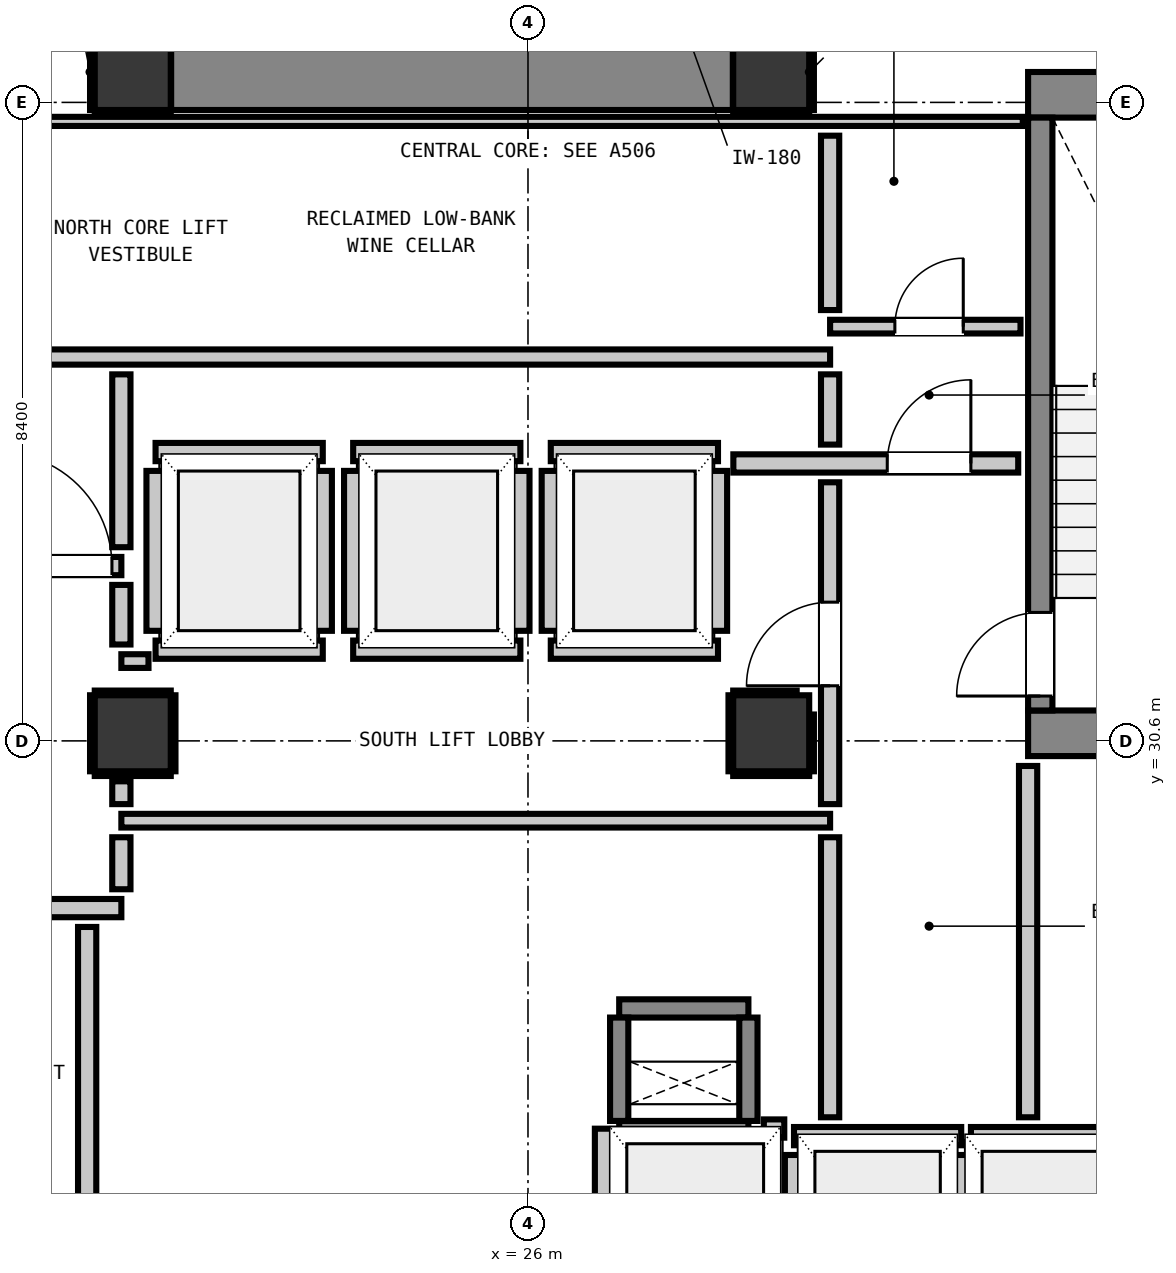
"""IFC4 building model, lengths in metres.
Left out: names, types, materials, properties, quantities, classifications, styles, units other than length and angle.
Written with IfcOpenShell. Run it as: python <this file> out.ifc"""

import sys

from ifc_helpers import new_model, si_unit, direction, frame, frame_2d, origin, origin_2d, place, context, subcontext, project, spatial, rectangle, extrude, element, fill, save


model = new_model("IFC4")
c1 = context("Model", 3, precision=1e-05, world=origin(), true_north=direction((0.0, 1.0)))
c2 = subcontext(c1, "Body", "Model", "MODEL_VIEW")
j1 = project(units=[si_unit("LENGTHUNIT", "METRE"), si_unit("PLANEANGLEUNIT", "RADIAN")], contexts=[c1])
p1 = place(None, origin())
s1 = spatial("IfcSite", under=j1, at=p1, CompositionType="ELEMENT")
p2 = place(p1, origin())
s2 = spatial("IfcBuilding", under=s1, at=p2, CompositionType="ELEMENT")
p3 = place(p2, frame((0.0, 0.0, 129.32)))
s3 = spatial("IfcBuildingStorey", under=s2, at=p3, CompositionType="ELEMENT", Elevation=129.32)
for number, where, z_axis, x_axis in (
    (1, (20.8, 39.4, 0.0), (0.0, 0.0, 1.0), (1.0, 0.0, 0.0)),
    (2, (29.2, 39.4, 0.0), (0.0, 0.0, 1.0), (1.0, 0.0, 0.0)),
):
    element("IfcColumn", number, at=place(p3, frame(where, z_axis=z_axis, x_axis=x_axis)), inside=s3, PredefinedType="COLUMN", context=c2, shape_type="SweptSolid", body=[
        extrude(rectangle(XDim=1.0, YDim=1.0, at=origin_2d()), origin(), (0.0, 0.0, 1.0), 3.32),
    ])
p4 = place(p3, frame((32.58, 39.1, 0.0), z_axis=(0.0, 0.0, 1.0), x_axis=(1.0, 0.0, 0.0)))
e3 = element("IfcWall", 3, at=p4, inside=s3, PredefinedType="SHEAR", context=c2, shape_type="SweptSolid", body=[
    extrude(rectangle(XDim=4.08, YDim=0.6, at=frame_2d((2.04, 0.0))), origin(), (0.0, 0.0, 1.0), 3.32),
])
p5 = place(p3, frame((32.58, 30.7, 0.0), z_axis=(0.0, 0.0, 1.0), x_axis=(1.0, 0.0, 0.0)))
e4 = element("IfcWall", 4, at=p5, inside=s3, PredefinedType="SHEAR", context=c2, shape_type="SweptSolid", body=[
    extrude(rectangle(XDim=3.415, YDim=0.6, at=frame_2d((1.708, 0.0))), origin(), (0.0, 0.0, 1.0), 3.32),
])
p6 = place(p3, frame((21.305, 39.4, 0.0), z_axis=(0.0, 0.0, 1.0), x_axis=(1.0, 0.0, 0.0)))
e5 = element("IfcWall", 5, at=p6, inside=s3, PredefinedType="SHEAR", context=c2, shape_type="SweptSolid", body=[
    extrude(rectangle(XDim=7.39, YDim=1.0, at=frame_2d((3.695, 0.0))), origin(), (0.0, 0.0, 1.0), 3.32),
])
p7 = place(p3, frame((32.74, 31.0, 0.0), z_axis=(0.0, 0.0, 1.0), x_axis=(0.0, 1.0, 0.0)))
e6 = element("IfcWall", 6, at=p7, inside=s3, PredefinedType="SHEAR", context=c2, shape_type="SweptSolid", body=[
    extrude(rectangle(XDim=7.8, YDim=0.32, at=frame_2d((3.9, 0.0))), origin(), (0.0, 0.0, 1.0), 3.32),
])
p8 = place(p7, frame((0.19, 0.0, 0.0)))
e7 = element("IfcOpeningElement", 7, at=p8, cuts=e6, PredefinedType="OPENING", context=c2, shape_type="SweptSolid", body=[
    extrude(rectangle(XDim=1.1, YDim=2.15, at=frame_2d((0.55, 1.075))), frame((0.0, 0.17, 0.0), z_axis=(0.0, -1.0, 0.0), x_axis=(1.0, 0.0, 0.0)), (0.0, 0.0, 1.0), 0.34),
])
for number, where, z_axis, x_axis in (
    (8, (27.2, 25.48, 0.0), (0.0, 0.0, 1.0), (1.0, 0.0, 0.0)),
    (9, (27.2, 27.08, 0.0), (0.0, 0.0, 1.0), (1.0, 0.0, 0.0)),
):
    element("IfcWall", number, at=place(p3, frame(where, z_axis=z_axis, x_axis=x_axis)), inside=s3, PredefinedType="SHEAR", context=c2, shape_type="SweptSolid", body=[
        extrude(rectangle(XDim=1.7, YDim=0.24, at=frame_2d((0.85, 0.0))), origin(), (0.0, 0.0, 1.0), 3.32),
    ])
for number, where, z_axis, x_axis in (
    (10, (27.2, 25.6, 0.0), (0.0, 0.0, 1.0), (0.0, 1.0, 0.0)),
    (11, (28.9, 25.6, 0.0), (0.0, 0.0, 1.0), (0.0, 1.0, 0.0)),
):
    element("IfcWall", number, at=place(p3, frame(where, z_axis=z_axis, x_axis=x_axis)), inside=s3, PredefinedType="SHEAR", context=c2, shape_type="SweptSolid", body=[
        extrude(rectangle(XDim=1.36, YDim=0.24, at=frame_2d((0.68, 0.0))), origin(), (0.0, 0.0, 1.0), 3.32),
    ])
for number, where, z_axis, x_axis in (
    (12, (20.8, 30.7, 0.0), (0.0, 0.0, 1.0), (1.0, 0.0, 0.0)),
    (13, (29.2, 30.7, 0.0), (0.0, 0.0, 1.0), (1.0, 0.0, 0.0)),
):
    element("IfcColumn", number, at=place(p3, frame(where, z_axis=z_axis, x_axis=x_axis)), inside=s3, PredefinedType="COLUMN", context=c2, shape_type="SweptSolid", body=[
        extrude(rectangle(XDim=1.0, YDim=1.0, at=origin_2d()), origin(), (0.0, 0.0, 1.0), 3.32),
    ])
for number, where, z_axis, x_axis in (
    (14, (21.1, 31.8, 0.0), (0.0, 0.0, 1.0), (1.0, 0.0, 0.0)),
    (15, (21.1, 34.4, 0.0), (0.0, 0.0, 1.0), (1.0, 0.0, 0.0)),
):
    element("IfcWall", number, at=place(p3, frame(where, z_axis=z_axis, x_axis=x_axis)), inside=s3, PredefinedType="PARTITIONING", context=c2, shape_type="SweptSolid", body=[
        extrude(rectangle(XDim=2.2, YDim=0.24, at=frame_2d((1.1, 0.0))), origin(), (0.0, 0.0, 1.0), 3.08),
    ])
p9 = place(p3, frame((21.1, 32.048, 0.0), z_axis=(0.0, 0.0, 1.0), x_axis=(0.0, 1.0, 0.0)))
e16 = element("IfcWall", 16, at=p9, inside=s3, PredefinedType="PARTITIONING", context=c2, shape_type="SweptSolid", body=[
    extrude(rectangle(XDim=2.104, YDim=0.24, at=frame_2d((1.052, 0.0))), origin(), (0.0, 0.0, 1.0), 2.315),
])
p10 = place(p3, frame((23.3, 32.048, 0.0), z_axis=(0.0, 0.0, 1.0), x_axis=(0.0, 1.0, 0.0)))
e17 = element("IfcWall", 17, at=p10, inside=s3, PredefinedType="PARTITIONING", context=c2, shape_type="SweptSolid", body=[
    extrude(rectangle(XDim=2.104, YDim=0.24, at=frame_2d((1.052, 0.0))), origin(), (0.0, 0.0, 1.0), 3.08),
])
for number, where, z_axis, x_axis in (
    (18, (23.7, 31.8, 0.0), (0.0, 0.0, 1.0), (1.0, 0.0, 0.0)),
    (19, (23.7, 34.4, 0.0), (0.0, 0.0, 1.0), (1.0, 0.0, 0.0)),
):
    element("IfcWall", number, at=place(p3, frame(where, z_axis=z_axis, x_axis=x_axis)), inside=s3, PredefinedType="PARTITIONING", context=c2, shape_type="SweptSolid", body=[
        extrude(rectangle(XDim=2.2, YDim=0.24, at=frame_2d((1.1, 0.0))), origin(), (0.0, 0.0, 1.0), 3.08),
    ])
for number, where, z_axis, x_axis in (
    (20, (23.7, 32.048, 0.0), (0.0, 0.0, 1.0), (0.0, 1.0, 0.0)),
    (21, (25.9, 32.048, 0.0), (0.0, 0.0, 1.0), (0.0, 1.0, 0.0)),
):
    element("IfcWall", number, at=place(p3, frame(where, z_axis=z_axis, x_axis=x_axis)), inside=s3, PredefinedType="PARTITIONING", context=c2, shape_type="SweptSolid", body=[
        extrude(rectangle(XDim=2.104, YDim=0.24, at=frame_2d((1.052, 0.0))), origin(), (0.0, 0.0, 1.0), 3.08),
    ])
for number, where, z_axis, x_axis in (
    (22, (26.3, 31.8, 0.0), (0.0, 0.0, 1.0), (1.0, 0.0, 0.0)),
    (23, (26.3, 34.4, 0.0), (0.0, 0.0, 1.0), (1.0, 0.0, 0.0)),
):
    element("IfcWall", number, at=place(p3, frame(where, z_axis=z_axis, x_axis=x_axis)), inside=s3, PredefinedType="PARTITIONING", context=c2, shape_type="SweptSolid", body=[
        extrude(rectangle(XDim=2.2, YDim=0.24, at=frame_2d((1.1, 0.0))), origin(), (0.0, 0.0, 1.0), 3.08),
    ])
for number, where, z_axis, x_axis in (
    (24, (26.3, 32.048, 0.0), (0.0, 0.0, 1.0), (0.0, 1.0, 0.0)),
    (25, (28.5, 32.048, 0.0), (0.0, 0.0, 1.0), (0.0, 1.0, 0.0)),
):
    element("IfcWall", number, at=place(p3, frame(where, z_axis=z_axis, x_axis=x_axis)), inside=s3, PredefinedType="PARTITIONING", context=c2, shape_type="SweptSolid", body=[
        extrude(rectangle(XDim=2.104, YDim=0.24, at=frame_2d((1.052, 0.0))), origin(), (0.0, 0.0, 1.0), 3.08),
    ])
p11 = place(p3, frame((29.5, 25.4, 0.0), z_axis=(0.0, 0.0, 1.0), x_axis=(1.0, 0.0, 0.0)))
e26 = element("IfcWall", 26, at=p11, inside=s3, PredefinedType="PARTITIONING", context=c2, shape_type="SweptSolid", body=[
    extrude(rectangle(XDim=2.2, YDim=0.24, at=frame_2d((1.1, 0.0))), origin(), (0.0, 0.0, 1.0), 3.08),
])
p12 = place(p3, frame((29.5, 22.632, 0.0), z_axis=(0.0, 0.0, 1.0), x_axis=(0.0, 1.0, 0.0)))
e27 = element("IfcWall", 27, at=p12, inside=s3, PredefinedType="PARTITIONING", context=c2, shape_type="SweptSolid", body=[
    extrude(rectangle(XDim=2.52, YDim=0.24, at=frame_2d((1.26, 0.0))), origin(), (0.0, 0.0, 1.0), 2.315),
])
p13 = place(p3, frame((31.7, 22.63, 0.0), z_axis=(0.0, 0.0, 1.0), x_axis=(0.0, 1.0, 0.0)))
e28 = element("IfcWall", 28, at=p13, inside=s3, PredefinedType="PARTITIONING", context=c2, shape_type="SweptSolid", body=[
    extrude(rectangle(XDim=2.522, YDim=0.24, at=frame_2d((1.261, 0.0))), origin(), (0.0, 0.0, 1.0), 3.08),
])
p14 = place(p3, frame((31.828, 25.4, 0.0), z_axis=(0.0, 0.0, 1.0), x_axis=(1.0, 0.0, 0.0)))
e29 = element("IfcWall", 29, at=p14, inside=s3, PredefinedType="PARTITIONING", context=c2, shape_type="SweptSolid", body=[
    extrude(rectangle(XDim=2.072, YDim=0.24, at=frame_2d((1.036, 0.0))), origin(), (0.0, 0.0, 1.0), 3.08),
])
p15 = place(p3, frame((29.103, 25.5, 0.0), z_axis=(0.0, 0.0, 1.0), x_axis=(1.0, 0.0, 0.0)))
e30 = element("IfcWall", 30, at=p15, inside=s3, PredefinedType="PARTITIONING", context=c2, shape_type="SweptSolid", body=[
    extrude(rectangle(XDim=0.269, YDim=0.24, at=frame_2d((0.135, 0.0))), origin(), (0.0, 0.0, 1.0), 3.08),
])
p16 = place(p3, frame((27.0, 22.63, 0.0), z_axis=(0.0, 0.0, 1.0), x_axis=(0.0, 1.0, 0.0)))
e31 = element("IfcWall", 31, at=p16, inside=s3, PredefinedType="PARTITIONING", context=c2, shape_type="SweptSolid", body=[
    extrude(rectangle(XDim=2.868, YDim=0.24, at=frame_2d((1.434, 0.0))), origin(), (0.0, 0.0, 1.0), 3.08),
])
p17 = place(p3, frame((17.45, 28.4, 0.0), z_axis=(0.0, 0.0, 1.0), x_axis=(1.0, 0.0, 0.0)))
e32 = element("IfcWall", 32, at=p17, inside=s3, PredefinedType="PARTITIONING", context=c2, shape_type="SweptSolid", body=[
    extrude(rectangle(XDim=3.2, YDim=0.24, at=frame_2d((1.6, 0.0))), origin(), (0.0, 0.0, 1.0), 3.08),
])
p18 = place(p17, frame((0.784, 0.0, 0.0)))
e33 = element("IfcOpeningElement", 33, at=p18, cuts=e32, PredefinedType="OPENING", context=c2, shape_type="SweptSolid", body=[
    extrude(rectangle(XDim=1.1, YDim=2.15, at=frame_2d((0.55, 1.075))), frame((0.0, 0.13, 0.0), z_axis=(0.0, -1.0, 0.0), x_axis=(1.0, 0.0, 0.0)), (0.0, 0.0, 1.0), 0.26),
])
p19 = place(p3, frame((17.45, 32.9, 0.0), z_axis=(0.0, 0.0, 1.0), x_axis=(1.0, 0.0, 0.0)))
e34 = element("IfcWall", 34, at=p19, inside=s3, PredefinedType="PARTITIONING", context=c2, shape_type="SweptSolid", body=[
    extrude(rectangle(XDim=3.2, YDim=0.24, at=frame_2d((1.6, 0.0))), origin(), (0.0, 0.0, 1.0), 3.08),
])
p20 = place(p19, frame((0.159, 0.0, 0.0)))
e35 = element("IfcOpeningElement", 35, at=p20, cuts=e34, PredefinedType="OPENING", context=c2, shape_type="SweptSolid", body=[
    extrude(rectangle(XDim=1.1, YDim=2.15, at=frame_2d((0.55, 1.075))), frame((0.0, 0.13, 0.0), z_axis=(0.0, -1.0, 0.0), x_axis=(1.0, 0.0, 0.0)), (0.0, 0.0, 1.0), 0.26),
])
p21 = place(p19, frame((1.576, 0.0, 0.0)))
e36 = element("IfcOpeningElement", 36, at=p21, cuts=e34, PredefinedType="OPENING", context=c2, shape_type="SweptSolid", body=[
    extrude(rectangle(XDim=1.5, YDim=2.15, at=frame_2d((0.75, 1.075))), frame((0.0, 0.13, 0.0), z_axis=(0.0, -1.0, 0.0), x_axis=(1.0, 0.0, 0.0)), (0.0, 0.0, 1.0), 0.26),
])
p22 = place(p3, frame((28.702, 34.25, 0.0), z_axis=(0.0, 0.0, 1.0), x_axis=(1.0, 0.0, 0.0)))
e37 = element("IfcWall", 37, at=p22, inside=s3, PredefinedType="PARTITIONING", context=c2, shape_type="SweptSolid", body=[
    extrude(rectangle(XDim=3.748, YDim=0.24, at=frame_2d((1.874, 0.0))), origin(), (0.0, 0.0, 1.0), 3.08),
])
p23 = place(p22, frame((2.025, 0.0, 0.0)))
e38 = element("IfcOpeningElement", 38, at=p23, cuts=e37, PredefinedType="OPENING", context=c2, shape_type="SweptSolid", body=[
    extrude(rectangle(XDim=1.1, YDim=2.15, at=frame_2d((0.55, 1.075))), frame((0.0, 0.13, 0.0), z_axis=(0.0, -1.0, 0.0), x_axis=(1.0, 0.0, 0.0)), (0.0, 0.0, 1.0), 0.26),
])
p24 = place(p3, frame((18.95, 35.65, 0.0), z_axis=(0.0, 0.0, 1.0), x_axis=(1.0, 0.0, 0.0)))
e39 = element("IfcWall", 39, at=p24, inside=s3, PredefinedType="PARTITIONING", context=c2, shape_type="SweptSolid", body=[
    extrude(rectangle(XDim=11.025, YDim=0.2, at=frame_2d((5.513, 0.0))), origin(), (0.0, 0.0, 1.0), 3.08),
])
p25 = place(p3, frame((20.65, 29.55, 0.0), z_axis=(0.0, 0.0, 1.0), x_axis=(1.0, 0.0, 0.0)))
e40 = element("IfcWall", 40, at=p25, inside=s3, PredefinedType="PARTITIONING", context=c2, shape_type="SweptSolid", body=[
    extrude(rectangle(XDim=9.325, YDim=0.18, at=frame_2d((4.663, 0.0))), origin(), (0.0, 0.0, 1.0), 3.08),
])
p26 = place(p3, frame((20.65, 31.65, 0.0), z_axis=(0.0, 0.0, 1.0), x_axis=(1.0, 0.0, 0.0)))
e41 = element("IfcWall", 41, at=p26, inside=s3, PredefinedType="PARTITIONING", context=c2, shape_type="SweptSolid", body=[
    extrude(rectangle(XDim=0.357, YDim=0.18, at=frame_2d((0.179, 0.0))), origin(), (0.0, 0.0, 1.0), 3.08),
])
p27 = place(p3, frame((29.975, 36.05, 0.0), z_axis=(0.0, 0.0, 1.0), x_axis=(1.0, 0.0, 0.0)))
e42 = element("IfcWall", 42, at=p27, inside=s3, PredefinedType="PARTITIONING", context=c2, shape_type="SweptSolid", body=[
    extrude(rectangle(XDim=2.505, YDim=0.18, at=frame_2d((1.252, 0.0))), origin(), (0.0, 0.0, 1.0), 3.08),
])
p28 = place(p27, frame((0.852, 0.0, 0.0)))
e43 = element("IfcOpeningElement", 43, at=p28, cuts=e42, PredefinedType="OPENING", context=c2, shape_type="SweptSolid", body=[
    extrude(rectangle(XDim=0.9, YDim=2.1, at=frame_2d((0.45, 1.05))), frame((0.0, 0.1, 0.0), z_axis=(0.0, -1.0, 0.0), x_axis=(1.0, 0.0, 0.0)), (0.0, 0.0, 1.0), 0.2),
])
p29 = place(p3, frame((18.95, 38.75, 0.0), z_axis=(0.0, 0.0, 1.0), x_axis=(1.0, 0.0, 0.0)))
e44 = element("IfcWall", 44, at=p29, inside=s3, PredefinedType="PARTITIONING", context=c2, shape_type="SweptSolid", body=[
    extrude(rectangle(XDim=13.56, YDim=0.12, at=frame_2d((6.78, 0.0))), origin(), (0.0, 0.0, 1.0), 3.08),
])
p30 = place(p3, frame((20.2, 22.586, 0.0), z_axis=(0.0, 0.0, 1.0), x_axis=(0.0, 1.0, 0.0)))
e45 = element("IfcWall", 45, at=p30, inside=s3, PredefinedType="PARTITIONING", context=c2, shape_type="SweptSolid", body=[
    extrude(rectangle(XDim=5.566, YDim=0.24, at=frame_2d((2.783, 0.0))), origin(), (0.0, 0.0, 1.0), 3.08),
])
p31 = place(p3, frame((20.65, 28.648, 0.0), z_axis=(0.0, 0.0, 1.0), x_axis=(0.0, 1.0, 0.0)))
e46 = element("IfcWall", 46, at=p31, inside=s3, PredefinedType="PARTITIONING", context=c2, shape_type="SweptSolid", body=[
    extrude(rectangle(XDim=0.684, YDim=0.24, at=frame_2d((0.342, 0.0))), origin(), (0.0, 0.0, 1.0), 2.315),
])
p32 = place(p3, frame((20.65, 29.768, 0.0), z_axis=(0.0, 0.0, 1.0), x_axis=(0.0, 1.0, 0.0)))
e47 = element("IfcWall", 47, at=p32, inside=s3, PredefinedType="PARTITIONING", context=c2, shape_type="SweptSolid", body=[
    extrude(rectangle(XDim=0.3, YDim=0.24, at=frame_2d((0.15, 0.0))), origin(), (0.0, 0.0, 1.0), 2.315),
])
p33 = place(p3, frame((20.65, 31.868, 0.0), z_axis=(0.0, 0.0, 1.0), x_axis=(0.0, 1.0, 0.0)))
e48 = element("IfcWall", 48, at=p33, inside=s3, PredefinedType="PARTITIONING", context=c2, shape_type="SweptSolid", body=[
    extrude(rectangle(XDim=0.784, YDim=0.24, at=frame_2d((0.392, 0.0))), origin(), (0.0, 0.0, 1.0), 2.315),
])
p34 = place(p3, frame((20.65, 33.148, 0.0), z_axis=(0.0, 0.0, 1.0), x_axis=(0.0, 1.0, 0.0)))
e49 = element("IfcWall", 49, at=p34, inside=s3, PredefinedType="PARTITIONING", context=c2, shape_type="SweptSolid", body=[
    extrude(rectangle(XDim=2.274, YDim=0.24, at=frame_2d((1.137, 0.0))), origin(), (0.0, 0.0, 1.0), 2.315),
])
p35 = place(p3, frame((29.975, 25.648, 0.0), z_axis=(0.0, 0.0, 1.0), x_axis=(0.0, 1.0, 0.0)))
e50 = element("IfcWall", 50, at=p35, inside=s3, PredefinedType="PARTITIONING", context=c2, shape_type="SweptSolid", body=[
    extrude(rectangle(XDim=3.684, YDim=0.24, at=frame_2d((1.842, 0.0))), origin(), (0.0, 0.0, 1.0), 3.08),
])
p36 = place(p3, frame((29.975, 29.768, 0.0), z_axis=(0.0, 0.0, 1.0), x_axis=(0.0, 1.0, 0.0)))
e51 = element("IfcWall", 51, at=p36, inside=s3, PredefinedType="PARTITIONING", context=c2, shape_type="SweptSolid", body=[
    extrude(rectangle(XDim=4.234, YDim=0.24, at=frame_2d((2.117, 0.0))), origin(), (0.0, 0.0, 1.0), 3.08),
])
p37 = place(p36, frame((1.557, 0.0, 0.0)))
e52 = element("IfcOpeningElement", 52, at=p37, cuts=e51, PredefinedType="OPENING", context=c2, shape_type="SweptSolid", body=[
    extrude(rectangle(XDim=1.1, YDim=2.15, at=frame_2d((0.55, 1.075))), frame((0.0, 0.13, 0.0), z_axis=(0.0, -1.0, 0.0), x_axis=(1.0, 0.0, 0.0)), (0.0, 0.0, 1.0), 0.26),
])
p38 = place(p3, frame((29.975, 34.498, 0.0), z_axis=(0.0, 0.0, 1.0), x_axis=(0.0, 1.0, 0.0)))
e53 = element("IfcWall", 53, at=p38, inside=s3, PredefinedType="PARTITIONING", context=c2, shape_type="SweptSolid", body=[
    extrude(rectangle(XDim=0.924, YDim=0.24, at=frame_2d((0.462, 0.0))), origin(), (0.0, 0.0, 1.0), 3.08),
])
p39 = place(p3, frame((29.975, 36.268, 0.0), z_axis=(0.0, 0.0, 1.0), x_axis=(0.0, 1.0, 0.0)))
e54 = element("IfcWall", 54, at=p39, inside=s3, PredefinedType="PARTITIONING", context=c2, shape_type="SweptSolid", body=[
    extrude(rectangle(XDim=2.294, YDim=0.24, at=frame_2d((1.147, 0.0))), origin(), (0.0, 0.0, 1.0), 3.08),
])
p40 = place(p3, frame((32.58, 25.648, 0.0), z_axis=(0.0, 0.0, 1.0), x_axis=(0.0, 1.0, 0.0)))
e55 = element("IfcWall", 55, at=p40, inside=s3, PredefinedType="PARTITIONING", context=c2, shape_type="SweptSolid", body=[
    extrude(rectangle(XDim=4.622, YDim=0.24, at=frame_2d((2.311, 0.0))), origin(), (0.0, 0.0, 1.0), 3.08),
])
for number, where, z_axis, x_axis in (
    (56, (20.3, 38.868, 0.0), (0.0, 0.0, 1.0), (1.0, 0.0, 0.0)),
    (57, (20.268, 38.9, 0.0), (0.0, 0.0, 1.0), (0.0, 1.0, 0.0)),
    (58, (28.7, 38.868, 0.0), (0.0, 0.0, 1.0), (1.0, 0.0, 0.0)),
    (59, (29.732, 38.9, 0.0), (0.0, 0.0, 1.0), (0.0, 1.0, 0.0)),
    (60, (20.3, 30.168, 0.0), (0.0, 0.0, 1.0), (1.0, 0.0, 0.0)),
    (61, (20.3, 31.232, 0.0), (0.0, 0.0, 1.0), (1.0, 0.0, 0.0)),
    (62, (20.268, 30.2, 0.0), (0.0, 0.0, 1.0), (0.0, 1.0, 0.0)),
    (63, (21.332, 30.2, 0.0), (0.0, 0.0, 1.0), (0.0, 1.0, 0.0)),
    (64, (28.7, 30.168, 0.0), (0.0, 0.0, 1.0), (1.0, 0.0, 0.0)),
):
    element("IfcWall", number, at=place(p3, frame(where, z_axis=z_axis, x_axis=x_axis)), inside=s3, PredefinedType="PARTITIONING", context=c2, shape_type="SweptSolid", body=[
        extrude(rectangle(XDim=1.0, YDim=0.06, at=frame_2d((0.5, 0.0))), origin(), (0.0, 0.0, 1.0), 1.45),
    ])
p41 = place(p3, frame((28.7, 31.232, 0.0), z_axis=(0.0, 0.0, 1.0), x_axis=(1.0, 0.0, 0.0)))
e65 = element("IfcWall", 65, at=p41, inside=s3, PredefinedType="PARTITIONING", context=c2, shape_type="SweptSolid", body=[
    extrude(rectangle(XDim=0.835, YDim=0.06, at=frame_2d((0.417, 0.0))), origin(), (0.0, 0.0, 1.0), 1.45),
])
p42 = place(p3, frame((28.668, 30.2, 0.0), z_axis=(0.0, 0.0, 1.0), x_axis=(0.0, 1.0, 0.0)))
e66 = element("IfcWall", 66, at=p42, inside=s3, PredefinedType="PARTITIONING", context=c2, shape_type="SweptSolid", body=[
    extrude(rectangle(XDim=1.0, YDim=0.06, at=frame_2d((0.5, 0.0))), origin(), (0.0, 0.0, 1.0), 1.45),
])
p43 = place(p3, frame((29.732, 30.2, 0.0), z_axis=(0.0, 0.0, 1.0), x_axis=(0.0, 1.0, 0.0)))
e67 = element("IfcWall", 67, at=p43, inside=s3, PredefinedType="PARTITIONING", context=c2, shape_type="SweptSolid", body=[
    extrude(rectangle(XDim=0.747, YDim=0.06, at=frame_2d((0.374, 0.0))), origin(), (0.0, 0.0, 1.0), 1.45),
])
p44 = place(p8, origin())
e68 = element("IfcDoor", 68, at=p44, inside=s3, OperationType="SINGLE_SWING_LEFT", PredefinedType="DOOR", context=c2, shape_type="SweptSolid", body=[
    extrude(rectangle(XDim=1.1, YDim=2.15, at=frame_2d((0.55, 1.075))), frame((0.0, 0.025, 0.0), z_axis=(0.0, -1.0, 0.0), x_axis=(1.0, 0.0, 0.0)), (0.0, 0.0, 1.0), 0.05),
])
fill(e7, e68)
p45 = place(p37, origin())
e69 = element("IfcDoor", 69, at=p45, inside=s3, OperationType="SINGLE_SWING_LEFT", PredefinedType="DOOR", context=c2, shape_type="SweptSolid", body=[
    extrude(rectangle(XDim=1.1, YDim=2.15, at=frame_2d((0.55, 1.075))), frame((0.0, 0.025, 0.0), z_axis=(0.0, -1.0, 0.0), x_axis=(1.0, 0.0, 0.0)), (0.0, 0.0, 1.0), 0.05),
])
fill(e52, e69)
p46 = place(p23, origin())
e70 = element("IfcDoor", 70, at=p46, inside=s3, OperationType="SINGLE_SWING_RIGHT", PredefinedType="DOOR", context=c2, shape_type="SweptSolid", body=[
    extrude(rectangle(XDim=1.1, YDim=2.15, at=frame_2d((0.55, 1.075))), frame((0.0, 0.025, 0.0), z_axis=(0.0, -1.0, 0.0), x_axis=(1.0, 0.0, 0.0)), (0.0, 0.0, 1.0), 0.05),
])
fill(e38, e70)
p47 = place(p21, origin())
e71 = element("IfcDoor", 71, at=p47, inside=s3, OperationType="SINGLE_SWING_LEFT", PredefinedType="DOOR", context=c2, shape_type="SweptSolid", body=[
    extrude(rectangle(XDim=1.5, YDim=2.15, at=frame_2d((0.75, 1.075))), frame((0.0, 0.025, 0.0), z_axis=(0.0, -1.0, 0.0), x_axis=(1.0, 0.0, 0.0)), (0.0, 0.0, 1.0), 0.05),
])
fill(e36, e71)
p48 = place(p28, origin())
e72 = element("IfcDoor", 72, at=p48, inside=s3, OperationType="SINGLE_SWING_RIGHT", PredefinedType="DOOR", context=c2, shape_type="SweptSolid", body=[
    extrude(rectangle(XDim=0.9, YDim=2.1, at=frame_2d((0.45, 1.05))), frame((0.0, 0.025, 0.0), z_axis=(0.0, -1.0, 0.0), x_axis=(1.0, 0.0, 0.0)), (0.0, 0.0, 1.0), 0.05),
])
fill(e43, e72)
save(model, sys.argv[1])
